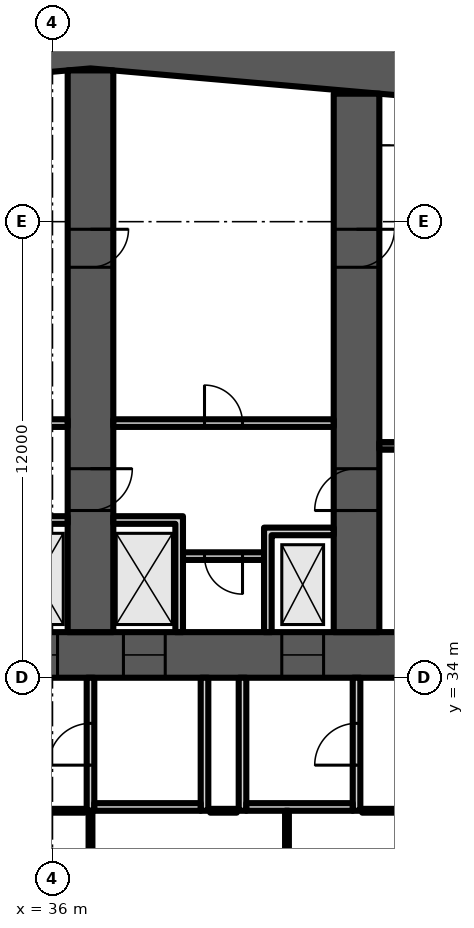
"""IFC4 building model, lengths in metres.
Left out: names, types, materials, properties, quantities, classifications, styles, units other than length and angle.
Written with IfcOpenShell. Run it as: python <this file> out.ifc"""

import sys

from ifc_helpers import new_model, si_unit, direction, frame, frame_2d, origin, place, context, subcontext, project, spatial, polyline, rectangle, outline, extrude, element, fill, save


model = new_model("IFC4")
c1 = context("Model", 3, precision=1e-05, world=origin(), true_north=direction((0.0, 1.0)))
c2 = subcontext(c1, "Body", "Model", "MODEL_VIEW")
j1 = project(units=[si_unit("LENGTHUNIT", "METRE"), si_unit("PLANEANGLEUNIT", "RADIAN")], contexts=[c1])
p1 = place(None, origin())
s1 = spatial("IfcSite", under=j1, at=p1, CompositionType="ELEMENT")
p2 = place(p1, origin())
s2 = spatial("IfcBuilding", under=s1, at=p2, CompositionType="ELEMENT")
p3 = place(p2, frame((0.0, 0.0, 45.1)))
s3 = spatial("IfcBuildingStorey", under=s2, at=p3, CompositionType="ELEMENT", Elevation=45.1)
p4 = place(p3, frame((0.0, 0.0, -0.0)))
e1 = element("IfcWall", 1, at=p4, inside=s3, PredefinedType="SHEAR", context=c2, shape_type="SweptSolid", body=[
    extrude(outline(polyline([(9.0, 47.583), (37.0, 50.032), (65.0, 47.583), (65.0, 48.787), (37.0, 51.237), (9.0, 48.787), (9.0, 47.583)])), origin(), (0.0, 0.0, 1.0), 3.6),
])
p5 = place(p3, frame((9.0, 34.6, 0.0), z_axis=(0.0, 0.0, 1.0), x_axis=(1.0, 0.0, 0.0)))
e2 = element("IfcWall", 2, at=p5, inside=s3, PredefinedType="SHEAR", context=c2, shape_type="SweptSolid", body=[
    extrude(rectangle(XDim=56.0, YDim=1.2, at=frame_2d((28.0, 0.0))), origin(), (0.0, 0.0, 1.0), 3.6),
])
p6 = place(p5, frame((2.0, 0.0, 0.0)))
e3 = element("IfcOpeningElement", 3, at=p6, cuts=e2, PredefinedType="OPENING", context=c2, shape_type="SweptSolid", body=[
    extrude(rectangle(XDim=1.0, YDim=2.1, at=frame_2d((0.5, 1.05))), frame((0.0, 0.61, 0.0), z_axis=(0.0, -1.0, 0.0), x_axis=(1.0, 0.0, 0.0)), (0.0, 0.0, 1.0), 1.22),
])
p7 = place(p5, frame((4.6, 0.0, 0.0)))
e4 = element("IfcOpeningElement", 4, at=p7, cuts=e2, PredefinedType="OPENING", context=c2, shape_type="SweptSolid", body=[
    extrude(rectangle(XDim=1.0, YDim=2.1, at=frame_2d((0.5, 1.05))), frame((0.0, 0.61, 0.0), z_axis=(0.0, -1.0, 0.0), x_axis=(1.0, 0.0, 0.0)), (0.0, 0.0, 1.0), 1.22),
])
p8 = place(p5, frame((7.867, 0.0, 0.0)))
e5 = element("IfcOpeningElement", 5, at=p8, cuts=e2, PredefinedType="OPENING", context=c2, shape_type="SweptSolid", body=[
    extrude(rectangle(XDim=1.1, YDim=2.1, at=frame_2d((0.55, 1.05))), frame((0.0, 0.61, 0.0), z_axis=(0.0, -1.0, 0.0), x_axis=(1.0, 0.0, 0.0)), (0.0, 0.0, 1.0), 1.22),
])
p9 = place(p5, frame((12.033, 0.0, 0.0)))
e6 = element("IfcOpeningElement", 6, at=p9, cuts=e2, PredefinedType="OPENING", context=c2, shape_type="SweptSolid", body=[
    extrude(rectangle(XDim=1.1, YDim=2.1, at=frame_2d((0.55, 1.05))), frame((0.0, 0.61, 0.0), z_axis=(0.0, -1.0, 0.0), x_axis=(1.0, 0.0, 0.0)), (0.0, 0.0, 1.0), 1.22),
])
p10 = place(p5, frame((9.8, 0.0, 0.0)))
e7 = element("IfcOpeningElement", 7, at=p10, cuts=e2, PredefinedType="OPENING", context=c2, shape_type="SweptSolid", body=[
    extrude(rectangle(XDim=1.4, YDim=2.1, at=frame_2d((0.7, 1.05))), frame((0.0, 0.61, 0.0), z_axis=(0.0, -1.0, 0.0), x_axis=(1.0, 0.0, 0.0)), (0.0, 0.0, 1.0), 1.22),
])
p11 = place(p5, frame((14.65, 0.0, 0.0)))
e8 = element("IfcOpeningElement", 8, at=p11, cuts=e2, PredefinedType="OPENING", context=c2, shape_type="SweptSolid", body=[
    extrude(rectangle(XDim=1.2, YDim=2.1, at=frame_2d((0.6, 1.05))), frame((0.0, 0.61, 0.0), z_axis=(0.0, -1.0, 0.0), x_axis=(1.0, 0.0, 0.0)), (0.0, 0.0, 1.0), 1.22),
])
p12 = place(p5, frame((21.867, 0.0, 0.0)))
e9 = element("IfcOpeningElement", 9, at=p12, cuts=e2, PredefinedType="OPENING", context=c2, shape_type="SweptSolid", body=[
    extrude(rectangle(XDim=1.1, YDim=2.1, at=frame_2d((0.55, 1.05))), frame((0.0, 0.61, 0.0), z_axis=(0.0, -1.0, 0.0), x_axis=(1.0, 0.0, 0.0)), (0.0, 0.0, 1.0), 1.22),
])
p13 = place(p5, frame((26.033, 0.0, 0.0)))
e10 = element("IfcOpeningElement", 10, at=p13, cuts=e2, PredefinedType="OPENING", context=c2, shape_type="SweptSolid", body=[
    extrude(rectangle(XDim=1.1, YDim=2.1, at=frame_2d((0.55, 1.05))), frame((0.0, 0.61, 0.0), z_axis=(0.0, -1.0, 0.0), x_axis=(1.0, 0.0, 0.0)), (0.0, 0.0, 1.0), 1.22),
])
p14 = place(p5, frame((23.8, 0.0, 0.0)))
e11 = element("IfcOpeningElement", 11, at=p14, cuts=e2, PredefinedType="OPENING", context=c2, shape_type="SweptSolid", body=[
    extrude(rectangle(XDim=1.4, YDim=2.1, at=frame_2d((0.7, 1.05))), frame((0.0, 0.61, 0.0), z_axis=(0.0, -1.0, 0.0), x_axis=(1.0, 0.0, 0.0)), (0.0, 0.0, 1.0), 1.22),
])
p15 = place(p5, frame((28.867, 0.0, 0.0)))
e12 = element("IfcOpeningElement", 12, at=p15, cuts=e2, PredefinedType="OPENING", context=c2, shape_type="SweptSolid", body=[
    extrude(rectangle(XDim=1.1, YDim=2.1, at=frame_2d((0.55, 1.05))), frame((0.0, 0.61, 0.0), z_axis=(0.0, -1.0, 0.0), x_axis=(1.0, 0.0, 0.0)), (0.0, 0.0, 1.0), 1.22),
])
p16 = place(p5, frame((33.033, 0.0, 0.0)))
e13 = element("IfcOpeningElement", 13, at=p16, cuts=e2, PredefinedType="OPENING", context=c2, shape_type="SweptSolid", body=[
    extrude(rectangle(XDim=1.1, YDim=2.1, at=frame_2d((0.55, 1.05))), frame((0.0, 0.61, 0.0), z_axis=(0.0, -1.0, 0.0), x_axis=(1.0, 0.0, 0.0)), (0.0, 0.0, 1.0), 1.22),
])
p17 = place(p5, frame((40.15, 0.0, 0.0)))
e14 = element("IfcOpeningElement", 14, at=p17, cuts=e2, PredefinedType="OPENING", context=c2, shape_type="SweptSolid", body=[
    extrude(rectangle(XDim=1.2, YDim=2.1, at=frame_2d((0.6, 1.05))), frame((0.0, 0.61, 0.0), z_axis=(0.0, -1.0, 0.0), x_axis=(1.0, 0.0, 0.0)), (0.0, 0.0, 1.0), 1.22),
])
p18 = place(p5, frame((44.8, 0.0, 0.0)))
e15 = element("IfcOpeningElement", 15, at=p18, cuts=e2, PredefinedType="OPENING", context=c2, shape_type="SweptSolid", body=[
    extrude(rectangle(XDim=1.4, YDim=2.1, at=frame_2d((0.7, 1.05))), frame((0.0, 0.61, 0.0), z_axis=(0.0, -1.0, 0.0), x_axis=(1.0, 0.0, 0.0)), (0.0, 0.0, 1.0), 1.22),
])
p19 = place(p5, frame((49.867, 0.0, 0.0)))
e16 = element("IfcOpeningElement", 16, at=p19, cuts=e2, PredefinedType="OPENING", context=c2, shape_type="SweptSolid", body=[
    extrude(rectangle(XDim=1.1, YDim=2.1, at=frame_2d((0.55, 1.05))), frame((0.0, 0.61, 0.0), z_axis=(0.0, -1.0, 0.0), x_axis=(1.0, 0.0, 0.0)), (0.0, 0.0, 1.0), 1.22),
])
p20 = place(p5, frame((53.5, 0.0, 0.0)))
e17 = element("IfcOpeningElement", 17, at=p20, cuts=e2, PredefinedType="OPENING", context=c2, shape_type="SweptSolid", body=[
    extrude(rectangle(XDim=1.1, YDim=2.1, at=frame_2d((0.55, 1.05))), frame((0.0, 0.61, 0.0), z_axis=(0.0, -1.0, 0.0), x_axis=(1.0, 0.0, 0.0)), (0.0, 0.0, 1.0), 1.22),
])
p21 = place(p5, frame((51.567, 0.0, 0.0)))
e18 = element("IfcOpeningElement", 18, at=p21, cuts=e2, PredefinedType="OPENING", context=c2, shape_type="SweptSolid", body=[
    extrude(rectangle(XDim=1.4, YDim=2.1, at=frame_2d((0.7, 1.05))), frame((0.0, 0.61, 0.0), z_axis=(0.0, -1.0, 0.0), x_axis=(1.0, 0.0, 0.0)), (0.0, 0.0, 1.0), 1.22),
])
p22 = place(p3, frame((37.0, 35.2, 0.0), z_axis=(0.0, 0.0, 1.0), x_axis=(0.0, 1.0, 0.0)))
e19 = element("IfcWall", 19, at=p22, inside=s3, PredefinedType="SHEAR", context=c2, shape_type="SweptSolid", body=[
    extrude(rectangle(XDim=14.78, YDim=1.2, at=frame_2d((7.39, 0.0))), origin(), (0.0, 0.0, 1.0), 3.6),
])
p23 = place(p22, frame((3.2, 0.0, 0.0)))
e20 = element("IfcOpeningElement", 20, at=p23, cuts=e19, PredefinedType="OPENING", context=c2, shape_type="SweptSolid", body=[
    extrude(rectangle(XDim=1.1, YDim=2.1, at=frame_2d((0.55, 1.05))), frame((0.0, 0.61, 0.0), z_axis=(0.0, -1.0, 0.0), x_axis=(1.0, 0.0, 0.0)), (0.0, 0.0, 1.0), 1.22),
])
p24 = place(p22, frame((9.6, 0.0, 0.0)))
e21 = element("IfcOpeningElement", 21, at=p24, cuts=e19, PredefinedType="OPENING", context=c2, shape_type="SweptSolid", body=[
    extrude(rectangle(XDim=1.0, YDim=2.1, at=frame_2d((0.5, 1.05))), frame((0.0, 0.61, 0.0), z_axis=(0.0, -1.0, 0.0), x_axis=(1.0, 0.0, 0.0)), (0.0, 0.0, 1.0), 1.22),
])
p25 = place(p3, frame((44.0, 35.2, 0.0), z_axis=(0.0, 0.0, 1.0), x_axis=(0.0, 1.0, 0.0)))
e22 = element("IfcWall", 22, at=p25, inside=s3, PredefinedType="SHEAR", context=c2, shape_type="SweptSolid", body=[
    extrude(rectangle(XDim=14.168, YDim=1.2, at=frame_2d((7.084, 0.0))), origin(), (0.0, 0.0, 1.0), 3.6),
])
p26 = place(p25, frame((3.2, 0.0, 0.0)))
e23 = element("IfcOpeningElement", 23, at=p26, cuts=e22, PredefinedType="OPENING", context=c2, shape_type="SweptSolid", body=[
    extrude(rectangle(XDim=1.1, YDim=2.1, at=frame_2d((0.55, 1.05))), frame((0.0, 0.61, 0.0), z_axis=(0.0, -1.0, 0.0), x_axis=(1.0, 0.0, 0.0)), (0.0, 0.0, 1.0), 1.22),
])
p27 = place(p25, frame((9.6, 0.0, 0.0)))
e24 = element("IfcOpeningElement", 24, at=p27, cuts=e22, PredefinedType="OPENING", context=c2, shape_type="SweptSolid", body=[
    extrude(rectangle(XDim=1.0, YDim=2.1, at=frame_2d((0.5, 1.05))), frame((0.0, 0.61, 0.0), z_axis=(0.0, -1.0, 0.0), x_axis=(1.0, 0.0, 0.0)), (0.0, 0.0, 1.0), 1.22),
])
p28 = place(p3, frame((30.6, 40.7, 0.0), z_axis=(0.0, 0.0, 1.0), x_axis=(1.0, 0.0, 0.0)))
e25 = element("IfcWall", 25, at=p28, inside=s3, PredefinedType="PARTITIONING", context=c2, shape_type="SweptSolid", body=[
    extrude(rectangle(XDim=5.8, YDim=0.2, at=frame_2d((2.9, 0.0))), origin(), (0.0, 0.0, 1.0), 3.2),
])
p29 = place(p28, frame((2.4, 0.0, 0.0)))
e26 = element("IfcOpeningElement", 26, at=p29, cuts=e25, PredefinedType="OPENING", context=c2, shape_type="SweptSolid", body=[
    extrude(rectangle(XDim=1.0, YDim=2.1, at=frame_2d((0.5, 1.05))), frame((0.0, 0.11, 0.0), z_axis=(0.0, -1.0, 0.0), x_axis=(1.0, 0.0, 0.0)), (0.0, 0.0, 1.0), 0.22),
])
p30 = place(p3, frame((0.0, 0.0, -0.0)))
e27 = element("IfcWall", 27, at=p30, inside=s3, PredefinedType="PARTITIONING", context=c2, shape_type="SweptSolid", body=[
    extrude(outline(polyline([(34.567, 38.25), (34.767, 38.25), (36.4, 38.25), (36.4, 38.05), (34.767, 38.05), (34.767, 35.2), (34.567, 35.2), (34.567, 38.25)])), origin(), (0.0, 0.0, 1.0), 3.2),
])
p31 = place(p3, frame((39.433, 37.2, 0.0), z_axis=(0.0, 0.0, 1.0), x_axis=(1.0, 0.0, 0.0)))
e28 = element("IfcWall", 28, at=p31, inside=s3, PredefinedType="PARTITIONING", context=c2, shape_type="SweptSolid", body=[
    extrude(rectangle(XDim=2.133, YDim=0.2, at=frame_2d((1.067, 0.0))), origin(), (0.0, 0.0, 1.0), 3.2),
])
p32 = place(p31, frame((0.567, 0.0, 0.0)))
e29 = element("IfcOpeningElement", 29, at=p32, cuts=e28, PredefinedType="OPENING", context=c2, shape_type="SweptSolid", body=[
    extrude(rectangle(XDim=1.0, YDim=2.1, at=frame_2d((0.5, 1.05))), frame((0.0, 0.11, 0.0), z_axis=(0.0, -1.0, 0.0), x_axis=(1.0, 0.0, 0.0)), (0.0, 0.0, 1.0), 0.22),
])
p33 = place(p3, frame((37.6, 40.7, 0.0), z_axis=(0.0, 0.0, 1.0), x_axis=(1.0, 0.0, 0.0)))
e30 = element("IfcWall", 30, at=p33, inside=s3, PredefinedType="PARTITIONING", context=c2, shape_type="SweptSolid", body=[
    extrude(rectangle(XDim=5.8, YDim=0.2, at=frame_2d((2.9, 0.0))), origin(), (0.0, 0.0, 1.0), 3.2),
])
p34 = place(p33, frame((2.4, 0.0, 0.0)))
e31 = element("IfcOpeningElement", 31, at=p34, cuts=e30, PredefinedType="OPENING", context=c2, shape_type="SweptSolid", body=[
    extrude(rectangle(XDim=1.0, YDim=2.1, at=frame_2d((0.5, 1.05))), frame((0.0, 0.11, 0.0), z_axis=(0.0, -1.0, 0.0), x_axis=(1.0, 0.0, 0.0)), (0.0, 0.0, 1.0), 0.22),
])
p35 = place(p3, frame((0.0, 0.0, -0.0)))
e32 = element("IfcWall", 32, at=p35, inside=s3, PredefinedType="PARTITIONING", context=c2, shape_type="SweptSolid", body=[
    extrude(outline(polyline([(41.567, 37.95), (41.767, 37.95), (43.4, 37.95), (43.4, 37.75), (41.767, 37.75), (41.767, 35.2), (41.567, 35.2), (41.567, 37.95)])), origin(), (0.0, 0.0, 1.0), 3.2),
])
p36 = place(p3, frame((0.0, 0.0, -0.0)))
e33 = element("IfcWall", 33, at=p36, inside=s3, PredefinedType="PARTITIONING", context=c2, shape_type="SweptSolid", body=[
    extrude(outline(polyline([(39.233, 38.05), (37.6, 38.05), (37.6, 38.25), (39.233, 38.25), (39.433, 38.25), (39.433, 35.2), (39.233, 35.2), (39.233, 38.05)])), origin(), (0.0, 0.0, 1.0), 3.2),
])
p37 = place(p3, frame((44.6, 40.1, 0.0), z_axis=(0.0, 0.0, 1.0), x_axis=(1.0, 0.0, 0.0)))
e34 = element("IfcWall", 34, at=p37, inside=s3, PredefinedType="SHEAR", context=c2, shape_type="SweptSolid", body=[
    extrude(rectangle(XDim=5.8, YDim=0.2, at=frame_2d((2.9, 0.0))), origin(), (0.0, 0.0, 1.0), 3.2),
])
p38 = place(p37, frame((3.325, 0.0, 0.0)))
e35 = element("IfcOpeningElement", 35, at=p38, cuts=e34, PredefinedType="OPENING", context=c2, shape_type="SweptSolid", body=[
    extrude(rectangle(XDim=1.2, YDim=2.1, at=frame_2d((0.6, 1.05))), frame((0.0, 0.11, 0.0), z_axis=(0.0, -1.0, 0.0), x_axis=(1.0, 0.0, 0.0)), (0.0, 0.0, 1.0), 0.22),
])
p39 = place(p37, frame((0.475, 0.0, 0.0)))
e36 = element("IfcOpeningElement", 36, at=p39, cuts=e34, PredefinedType="OPENING", context=c2, shape_type="SweptSolid", body=[
    extrude(rectangle(XDim=0.9, YDim=2.1, at=frame_2d((0.45, 1.05))), frame((0.0, 0.11, 0.0), z_axis=(0.0, -1.0, 0.0), x_axis=(1.0, 0.0, 0.0)), (0.0, 0.0, 1.0), 0.22),
])
p40 = place(p3, frame((37.0, 30.5, 0.0), z_axis=(0.0, 0.0, 1.0), x_axis=(0.0, 1.0, 0.0)))
e37 = element("IfcWall", 37, at=p40, inside=s3, PredefinedType="PARTITIONING", context=c2, shape_type="SweptSolid", body=[
    extrude(rectangle(XDim=3.5, YDim=0.2, at=frame_2d((1.75, 0.0))), origin(), (0.0, 0.0, 1.0), 3.2),
])
p41 = place(p40, frame((1.2, 0.0, 0.0)))
e38 = element("IfcOpeningElement", 38, at=p41, cuts=e37, PredefinedType="OPENING", context=c2, shape_type="SweptSolid", body=[
    extrude(rectangle(XDim=1.1, YDim=2.1, at=frame_2d((0.55, 1.05))), frame((0.0, 0.11, 0.0), z_axis=(0.0, -1.0, 0.0), x_axis=(1.0, 0.0, 0.0)), (0.0, 0.0, 1.0), 0.22),
])
p42 = place(p3, frame((40.0, 30.5, 0.0), z_axis=(0.0, 0.0, 1.0), x_axis=(0.0, 1.0, 0.0)))
e39 = element("IfcWall", 39, at=p42, inside=s3, PredefinedType="PARTITIONING", context=c2, shape_type="SweptSolid", body=[
    extrude(rectangle(XDim=3.5, YDim=0.2, at=frame_2d((1.75, 0.0))), origin(), (0.0, 0.0, 1.0), 3.2),
])
p43 = place(p3, frame((37.1, 30.6, 0.0), z_axis=(0.0, 0.0, 1.0), x_axis=(1.0, 0.0, 0.0)))
e40 = element("IfcWall", 40, at=p43, inside=s3, PredefinedType="PARTITIONING", context=c2, shape_type="SweptSolid", body=[
    extrude(rectangle(XDim=2.8, YDim=0.2, at=frame_2d((1.4, 0.0))), origin(), (0.0, 0.0, 1.0), 3.2),
])
p44 = place(p3, frame((41.0, 30.5, 0.0), z_axis=(0.0, 0.0, 1.0), x_axis=(0.0, 1.0, 0.0)))
e41 = element("IfcWall", 41, at=p44, inside=s3, PredefinedType="PARTITIONING", context=c2, shape_type="SweptSolid", body=[
    extrude(rectangle(XDim=3.5, YDim=0.2, at=frame_2d((1.75, 0.0))), origin(), (0.0, 0.0, 1.0), 3.2),
])
p45 = place(p3, frame((44.0, 30.5, 0.0), z_axis=(0.0, 0.0, 1.0), x_axis=(0.0, 1.0, 0.0)))
e42 = element("IfcWall", 42, at=p45, inside=s3, PredefinedType="PARTITIONING", context=c2, shape_type="SweptSolid", body=[
    extrude(rectangle(XDim=3.5, YDim=0.2, at=frame_2d((1.75, 0.0))), origin(), (0.0, 0.0, 1.0), 3.2),
])
p46 = place(p45, frame((1.2, 0.0, 0.0)))
e43 = element("IfcOpeningElement", 43, at=p46, cuts=e42, PredefinedType="OPENING", context=c2, shape_type="SweptSolid", body=[
    extrude(rectangle(XDim=1.1, YDim=2.1, at=frame_2d((0.55, 1.05))), frame((0.0, 0.11, 0.0), z_axis=(0.0, -1.0, 0.0), x_axis=(1.0, 0.0, 0.0)), (0.0, 0.0, 1.0), 0.22),
])
p47 = place(p3, frame((41.1, 30.6, 0.0), z_axis=(0.0, 0.0, 1.0), x_axis=(1.0, 0.0, 0.0)))
e44 = element("IfcWall", 44, at=p47, inside=s3, PredefinedType="PARTITIONING", context=c2, shape_type="SweptSolid", body=[
    extrude(rectangle(XDim=2.8, YDim=0.2, at=frame_2d((1.4, 0.0))), origin(), (0.0, 0.0, 1.0), 3.2),
])
p48 = place(p3, frame((10.8, 30.5, 0.0), z_axis=(0.0, 0.0, 1.0), x_axis=(1.0, 0.0, 0.0)))
e45 = element("IfcWall", 45, at=p48, inside=s3, PredefinedType="PARTITIONING", context=c2, shape_type="SweptSolid", body=[
    extrude(rectangle(XDim=26.05, YDim=0.1, at=frame_2d((13.025, 0.0))), origin(), (0.0, 0.0, 1.0), 3.2),
])
p49 = place(p48, frame((0.235, 0.0, 0.0)))
e46 = element("IfcOpeningElement", 46, at=p49, cuts=e45, PredefinedType="OPENING", context=c2, shape_type="SweptSolid", body=[
    extrude(rectangle(XDim=1.0, YDim=2.1, at=frame_2d((0.5, 1.05))), frame((0.0, 0.06, 0.0), z_axis=(0.0, -1.0, 0.0), x_axis=(1.0, 0.0, 0.0)), (0.0, 0.0, 1.0), 0.12),
])
p50 = place(p48, frame((10.955, 0.0, 0.0)))
e47 = element("IfcOpeningElement", 47, at=p50, cuts=e45, PredefinedType="OPENING", context=c2, shape_type="SweptSolid", body=[
    extrude(rectangle(XDim=1.0, YDim=2.1, at=frame_2d((0.5, 1.05))), frame((0.0, 0.06, 0.0), z_axis=(0.0, -1.0, 0.0), x_axis=(1.0, 0.0, 0.0)), (0.0, 0.0, 1.0), 0.12),
])
for number, where, z_axis, x_axis in (
    (48, (37.0, 14.24, 0.0), (0.0, 0.0, 1.0), (0.0, 1.0, 0.0)),
    (49, (42.17, 14.24, 0.0), (0.0, 0.0, 1.0), (0.0, 1.0, 0.0)),
):
    element("IfcWall", number, at=place(p3, frame(where, z_axis=z_axis, x_axis=x_axis)), inside=s3, PredefinedType="PARTITIONING", context=c2, shape_type="SweptSolid", body=[
        extrude(rectangle(XDim=16.26, YDim=0.1, at=frame_2d((8.13, 0.0))), origin(), (0.0, 0.0, 1.0), 3.2),
    ])
p51 = place(p3, frame((40.15, 30.5, 0.0), z_axis=(0.0, 0.0, 1.0), x_axis=(1.0, 0.0, 0.0)))
e50 = element("IfcWall", 50, at=p51, inside=s3, PredefinedType="PARTITIONING", context=c2, shape_type="SweptSolid", body=[
    extrude(rectangle(XDim=0.7, YDim=0.1, at=frame_2d((0.35, 0.0))), origin(), (0.0, 0.0, 1.0), 3.2),
])
p52 = place(p3, frame((44.15, 30.5, 0.0), z_axis=(0.0, 0.0, 1.0), x_axis=(1.0, 0.0, 0.0)))
e51 = element("IfcWall", 51, at=p52, inside=s3, PredefinedType="PARTITIONING", context=c2, shape_type="SweptSolid", body=[
    extrude(rectangle(XDim=19.42, YDim=0.1, at=frame_2d((9.71, 0.0))), origin(), (0.0, 0.0, 1.0), 3.2),
])
p53 = place(p52, frame((15.54, 0.0, 0.0)))
e52 = element("IfcOpeningElement", 52, at=p53, cuts=e51, PredefinedType="OPENING", context=c2, shape_type="SweptSolid", body=[
    extrude(rectangle(XDim=1.0, YDim=2.1, at=frame_2d((0.5, 1.05))), frame((0.0, 0.06, 0.0), z_axis=(0.0, -1.0, 0.0), x_axis=(1.0, 0.0, 0.0)), (0.0, 0.0, 1.0), 0.12),
])
p54 = place(p13, origin())
e53 = element("IfcDoor", 53, at=p54, inside=s3, OperationType="DOUBLE_DOOR_SLIDING", PredefinedType="DOOR", context=c2, shape_type="SweptSolid", body=[
    extrude(rectangle(XDim=1.1, YDim=2.1, at=frame_2d((0.55, 1.05))), frame((0.0, 0.025, 0.0), z_axis=(0.0, -1.0, 0.0), x_axis=(1.0, 0.0, 0.0)), (0.0, 0.0, 1.0), 0.05),
])
fill(e10, e53)
p55 = place(p32, origin())
e54 = element("IfcDoor", 54, at=p55, inside=s3, OperationType="SINGLE_SWING_RIGHT", PredefinedType="DOOR", context=c2, shape_type="SweptSolid", body=[
    extrude(rectangle(XDim=1.0, YDim=2.1, at=frame_2d((0.5, 1.05))), frame((0.0, 0.025, 0.0), z_axis=(0.0, -1.0, 0.0), x_axis=(1.0, 0.0, 0.0)), (0.0, 0.0, 1.0), 0.05),
])
fill(e29, e54)
p56 = place(p15, origin())
e55 = element("IfcDoor", 55, at=p56, inside=s3, OperationType="DOUBLE_DOOR_SLIDING", PredefinedType="DOOR", context=c2, shape_type="SweptSolid", body=[
    extrude(rectangle(XDim=1.1, YDim=2.1, at=frame_2d((0.55, 1.05))), frame((0.0, 0.025, 0.0), z_axis=(0.0, -1.0, 0.0), x_axis=(1.0, 0.0, 0.0)), (0.0, 0.0, 1.0), 0.05),
])
fill(e12, e55)
p57 = place(p16, origin())
e56 = element("IfcDoor", 56, at=p57, inside=s3, OperationType="DOUBLE_DOOR_SLIDING", PredefinedType="DOOR", context=c2, shape_type="SweptSolid", body=[
    extrude(rectangle(XDim=1.1, YDim=2.1, at=frame_2d((0.55, 1.05))), frame((0.0, 0.025, 0.0), z_axis=(0.0, -1.0, 0.0), x_axis=(1.0, 0.0, 0.0)), (0.0, 0.0, 1.0), 0.05),
])
fill(e13, e56)
p58 = place(p34, origin())
e57 = element("IfcDoor", 57, at=p58, inside=s3, OperationType="SINGLE_SWING_LEFT", PredefinedType="DOOR", context=c2, shape_type="SweptSolid", body=[
    extrude(rectangle(XDim=1.0, YDim=2.1, at=frame_2d((0.5, 1.05))), frame((0.0, 0.025, 0.0), z_axis=(0.0, -1.0, 0.0), x_axis=(1.0, 0.0, 0.0)), (0.0, 0.0, 1.0), 0.05),
])
fill(e31, e57)
p59 = place(p23, origin())
e58 = element("IfcDoor", 58, at=p59, inside=s3, OperationType="SINGLE_SWING_RIGHT", PredefinedType="DOOR", context=c2, shape_type="SweptSolid", body=[
    extrude(rectangle(XDim=1.1, YDim=2.1, at=frame_2d((0.55, 1.05))), frame((0.0, 0.025, 0.0), z_axis=(0.0, -1.0, 0.0), x_axis=(1.0, 0.0, 0.0)), (0.0, 0.0, 1.0), 0.05),
])
fill(e20, e58)
p60 = place(p24, origin())
e59 = element("IfcDoor", 59, at=p60, inside=s3, OperationType="SINGLE_SWING_RIGHT", PredefinedType="DOOR", context=c2, shape_type="SweptSolid", body=[
    extrude(rectangle(XDim=1.0, YDim=2.1, at=frame_2d((0.5, 1.05))), frame((0.0, 0.6, 0.0), z_axis=(0.0, -1.0, 0.0), x_axis=(1.0, 0.0, 0.0)), (0.0, 0.0, 1.0), 1.199),
])
fill(e21, e59)
p61 = place(p26, origin())
e60 = element("IfcDoor", 60, at=p61, inside=s3, OperationType="SINGLE_SWING_LEFT", PredefinedType="DOOR", context=c2, shape_type="SweptSolid", body=[
    extrude(rectangle(XDim=1.1, YDim=2.1, at=frame_2d((0.55, 1.05))), frame((0.0, 0.025, 0.0), z_axis=(0.0, -1.0, 0.0), x_axis=(1.0, 0.0, 0.0)), (0.0, 0.0, 1.0), 0.05),
])
fill(e23, e60)
p62 = place(p27, origin())
e61 = element("IfcDoor", 61, at=p62, inside=s3, OperationType="SINGLE_SWING_RIGHT", PredefinedType="DOOR", context=c2, shape_type="SweptSolid", body=[
    extrude(rectangle(XDim=1.0, YDim=2.1, at=frame_2d((0.5, 1.05))), frame((0.0, 0.6, 0.0), z_axis=(0.0, -1.0, 0.0), x_axis=(1.0, 0.0, 0.0)), (0.0, 0.0, 1.0), 1.199),
])
fill(e24, e61)
p63 = place(p41, origin())
e62 = element("IfcDoor", 62, at=p63, inside=s3, OperationType="SINGLE_SWING_LEFT", PredefinedType="DOOR", context=c2, shape_type="SweptSolid", body=[
    extrude(rectangle(XDim=1.1, YDim=2.1, at=frame_2d((0.55, 1.05))), frame((0.0, 0.025, 0.0), z_axis=(0.0, -1.0, 0.0), x_axis=(1.0, 0.0, 0.0)), (0.0, 0.0, 1.0), 0.05),
])
fill(e38, e62)
p64 = place(p46, origin())
e63 = element("IfcDoor", 63, at=p64, inside=s3, OperationType="SINGLE_SWING_LEFT", PredefinedType="DOOR", context=c2, shape_type="SweptSolid", body=[
    extrude(rectangle(XDim=1.1, YDim=2.1, at=frame_2d((0.55, 1.05))), frame((0.0, 0.025, 0.0), z_axis=(0.0, -1.0, 0.0), x_axis=(1.0, 0.0, 0.0)), (0.0, 0.0, 1.0), 0.05),
])
fill(e43, e63)
save(model, sys.argv[1])
